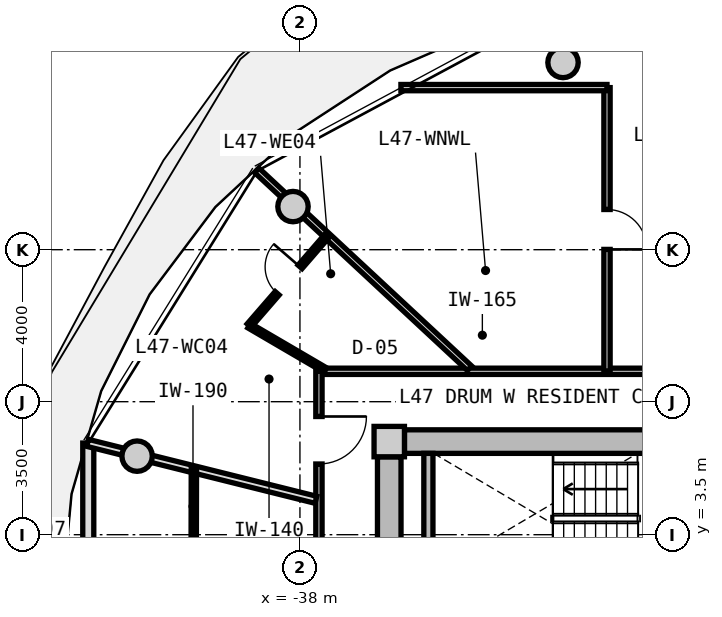
"""IFC4 building model, lengths in metres.
Left out: names, types, materials, properties, quantities, classifications, styles, units other than length and angle.
Written with IfcOpenShell. Run it as: python <this file> out.ifc"""

import sys

from ifc_helpers import new_model, si_unit, direction, frame, frame_2d, origin, origin_2d, place, context, subcontext, project, spatial, rectangle, circle, extrude, source, transform, mapped, element, fill, save


model = new_model("IFC4")
c1 = context("Model", 3, precision=1e-05, world=origin(), true_north=direction((0.0, 1.0)))
c2 = subcontext(c1, "Body", "Model", "MODEL_VIEW")
j1 = project(units=[si_unit("LENGTHUNIT", "METRE"), si_unit("PLANEANGLEUNIT", "RADIAN")], contexts=[c1])
p1 = place(None, origin())
s1 = spatial("IfcSite", under=j1, at=p1, CompositionType="ELEMENT")
p2 = place(p1, origin())
s2 = spatial("IfcBuilding", under=s1, at=p2, CompositionType="ELEMENT")
p3 = place(p2, frame((0.0, 0.0, 152.6)))
s3 = spatial("IfcBuildingStorey", under=s2, at=p3, CompositionType="ELEMENT", Elevation=152.6)
m1 = source(origin(), c2, "Body", "SweptSolid", [
    extrude(rectangle(XDim=0.8, YDim=0.8, at=origin_2d()), origin(), (0.0, 0.0, 1.0), 3.05),
])
p4 = place(p3, frame((-35.65, 5.95, 0.0), z_axis=(0.0, 0.0, 1.0), x_axis=(1.0, 0.0, 0.0)))
e1 = element("IfcColumn", 1, at=p4, inside=s3, PredefinedType="COLUMN", context=c2, shape_type="MappedRepresentation", body=[
    mapped(m1, transform((0.0, 0.0, 0.0), x_axis=(1.0, 0.0, 0.0), y_axis=(0.0, 1.0, 0.0), z_axis=(0.0, 0.0, 1.0), scale=1.0)),
])
m2 = source(origin(), c2, "Body", "SweptSolid", [
    extrude(rectangle(XDim=14.5, YDim=0.62, at=frame_2d((7.25, 0.0))), origin(), (0.0, 0.0, 1.0), 2.81),
])
p5 = place(p3, frame((-35.25, 5.95, 0.0), z_axis=(0.0, 0.0, 1.0), x_axis=(1.0, 0.0, 0.0)))
e2 = element("IfcWall", 2, at=p5, inside=s3, PredefinedType="SHEAR", context=c2, shape_type="MappedRepresentation", body=[
    mapped(m2, transform((0.0, 0.0, 0.0), x_axis=(1.0, 0.0, 0.0), y_axis=(0.0, 1.0, 0.0), z_axis=(0.0, 0.0, 1.0), scale=1.0)),
])
m3 = source(origin(), c2, "Body", "SweptSolid", [
    extrude(rectangle(XDim=11.1, YDim=0.62, at=frame_2d((5.55, 0.0))), origin(), (0.0, 0.0, 1.0), 2.81),
])
p6 = place(p3, frame((-35.65, -5.55, 0.0), z_axis=(0.0, 0.0, 1.0), x_axis=(0.0, 1.0, 0.0)))
e3 = element("IfcWall", 3, at=p6, inside=s3, PredefinedType="SHEAR", context=c2, shape_type="MappedRepresentation", body=[
    mapped(m3, transform((0.0, 0.0, 0.0), x_axis=(1.0, 0.0, 0.0), y_axis=(0.0, 1.0, 0.0), z_axis=(0.0, 0.0, 1.0), scale=1.0)),
])
p7 = place(p6, frame((3.8, 0.0, 0.0)))
e4 = element("IfcOpeningElement", 4, at=p7, cuts=e3, PredefinedType="OPENING", context=c2, shape_type="SweptSolid", body=[
    extrude(rectangle(XDim=1.2, YDim=2.15, at=frame_2d((0.6, 1.075))), frame((0.0, 0.32, 0.0), z_axis=(0.0, -1.0, 0.0), x_axis=(1.0, 0.0, 0.0)), (0.0, 0.0, 1.0), 0.64),
])
m4 = source(origin(), c2, "Body", "SweptSolid", [
    extrude(circle(Radius=0.4, at=origin_2d()), origin(), (0.0, 0.0, 1.0), 3.05),
])
for number, where, z_axis, x_axis in (
    (5, (-31.077, 15.926, 0.0), (0.0, 0.0, 1.0), (1.0, 0.0, 0.0)),
    (6, (-38.183, 12.135, 0.0), (0.0, 0.0, 1.0), (1.0, 0.0, 0.0)),
    (7, (-42.285, 5.567, 0.0), (0.0, 0.0, 1.0), (1.0, 0.0, 0.0)),
):
    element("IfcColumn", number, at=place(p3, frame(where, z_axis=z_axis, x_axis=x_axis)), inside=s3, PredefinedType="COLUMN", context=c2, shape_type="MappedRepresentation", body=[
        mapped(m4, transform((0.0, 0.0, 0.0), x_axis=(1.0, 0.0, 0.0), y_axis=(0.0, 1.0, 0.0), z_axis=(0.0, 0.0, 1.0), scale=1.0)),
    ])
m5 = source(origin(), c2, "Body", "SweptSolid", [
    extrude(rectangle(XDim=8.272, YDim=0.29, at=frame_2d((4.136, 0.0))), origin(), (0.0, 0.0, 1.0), 2.81),
])
p8 = place(p3, frame((-43.57, -2.361, 0.0), z_axis=(0.0, 0.0, 1.0), x_axis=(0.0, 1.0, 0.0)))
e8 = element("IfcWall", 8, at=p8, inside=s3, PredefinedType="SOLIDWALL", context=c2, shape_type="MappedRepresentation", body=[
    mapped(m5, transform((0.0, 0.0, 0.0), x_axis=(1.0, 0.0, 0.0), y_axis=(0.0, 1.0, 0.0), z_axis=(0.0, 0.0, 1.0), scale=1.0)),
])
p9 = place(p8, frame((0.9, 0.0, 0.0)))
e9 = element("IfcOpeningElement", 9, at=p9, cuts=e8, PredefinedType="OPENING", context=c2, shape_type="SweptSolid", body=[
    extrude(rectangle(XDim=1.15, YDim=2.25, at=frame_2d((0.575, 1.125))), frame((0.0, 0.155, 0.0), z_axis=(0.0, -1.0, 0.0), x_axis=(1.0, 0.0, 0.0)), (0.0, 0.0, 1.0), 0.31),
])
p10 = place(p8, frame((4.486, 0.0, 0.85)))
e10 = element("IfcOpeningElement", 10, at=p10, cuts=e8, PredefinedType="OPENING", context=c2, shape_type="SweptSolid", body=[
    extrude(rectangle(XDim=1.2, YDim=1.5, at=frame_2d((0.6, 0.75))), frame((0.0, 0.155, 0.0), z_axis=(0.0, -1.0, 0.0), x_axis=(1.0, 0.0, 0.0)), (0.0, 0.0, 1.0), 0.31),
])
m6 = source(origin(), c2, "Body", "SweptSolid", [
    extrude(rectangle(XDim=3.19, YDim=0.24, at=frame_2d((1.595, 0.0))), origin(), (0.0, 0.0, 1.0), 2.81),
])
p11 = place(p3, frame((-34.62, 2.45, 0.0), z_axis=(0.0, 0.0, 1.0), x_axis=(0.0, 1.0, 0.0)))
e11 = element("IfcWall", 11, at=p11, inside=s3, PredefinedType="PARTITIONING", context=c2, shape_type="MappedRepresentation", body=[
    mapped(m6, transform((0.0, 0.0, 0.0), x_axis=(1.0, 0.0, 0.0), y_axis=(0.0, 1.0, 0.0), z_axis=(0.0, 0.0, 1.0), scale=1.0)),
])
m7 = source(origin(), c2, "Body", "SweptSolid", [
    extrude(rectangle(XDim=8.6, YDim=0.165, at=frame_2d((4.3, 0.0))), origin(), (0.0, 0.0, 1.0), 2.795),
])
p12 = place(p3, frame((-37.5, 7.8, 0.0), z_axis=(0.0, 0.0, 1.0), x_axis=(1.0, 0.0, 0.0)))
e12 = element("IfcWall", 12, at=p12, inside=s3, PredefinedType="PARTITIONING", context=c2, shape_type="MappedRepresentation", body=[
    mapped(m7, transform((0.0, 0.0, 0.0), x_axis=(1.0, 0.0, 0.0), y_axis=(0.0, 1.0, 0.0), z_axis=(0.0, 0.0, 1.0), scale=1.0)),
])
m8 = source(origin(), c2, "Body", "SweptSolid", [
    extrude(rectangle(XDim=15.6, YDim=0.165, at=frame_2d((7.8, 0.0))), origin(), (0.0, 0.0, 1.0), 2.795),
])
p13 = place(p3, frame((-37.5, -7.8, 0.0), z_axis=(0.0, 0.0, 1.0), x_axis=(0.0, 1.0, 0.0)))
e13 = element("IfcWall", 13, at=p13, inside=s3, PredefinedType="PARTITIONING", context=c2, shape_type="MappedRepresentation", body=[
    mapped(m8, transform((0.0, 0.0, 0.0), x_axis=(1.0, 0.0, 0.0), y_axis=(0.0, 1.0, 0.0), z_axis=(0.0, 0.0, 1.0), scale=1.0)),
])
p14 = place(p13, frame((13.16, 0.0, 0.0)))
e14 = element("IfcOpeningElement", 14, at=p14, cuts=e13, PredefinedType="OPENING", context=c2, shape_type="SweptSolid", body=[
    extrude(rectangle(XDim=1.25, YDim=2.2, at=frame_2d((0.625, 1.1))), frame((0.0, 0.093, 0.0), z_axis=(0.0, -1.0, 0.0), x_axis=(1.0, 0.0, 0.0)), (0.0, 0.0, 1.0), 0.185),
])
p15 = place(p13, frame((7.757, 0.0, 0.0)))
e15 = element("IfcOpeningElement", 15, at=p15, cuts=e13, PredefinedType="OPENING", context=c2, shape_type="SweptSolid", body=[
    extrude(rectangle(XDim=1.25, YDim=2.2, at=frame_2d((0.625, 1.1))), frame((0.0, 0.093, 0.0), z_axis=(0.0, -1.0, 0.0), x_axis=(1.0, 0.0, 0.0)), (0.0, 0.0, 1.0), 0.185),
])
p16 = place(p13, frame((1.62, 0.0, 0.0)))
e16 = element("IfcOpeningElement", 16, at=p16, cuts=e13, PredefinedType="OPENING", context=c2, shape_type="SweptSolid", body=[
    extrude(rectangle(XDim=1.25, YDim=2.2, at=frame_2d((0.625, 1.1))), frame((0.0, 0.093, 0.0), z_axis=(0.0, -1.0, 0.0), x_axis=(1.0, 0.0, 0.0)), (0.0, 0.0, 1.0), 0.185),
])
m9 = source(origin(), c2, "Body", "SweptSolid", [
    extrude(rectangle(XDim=7.648, YDim=0.165, at=frame_2d((3.824, 0.0))), origin(), (0.0, 0.0, 1.0), 2.345),
])
p17 = place(p3, frame((-33.538, 7.88, 0.0), z_axis=(0.0, 0.0, 1.0), x_axis=(-0.732167856666, 0.681124239522, 0.0)))
e17 = element("IfcWall", 17, at=p17, inside=s3, PredefinedType="PARTITIONING", context=c2, shape_type="MappedRepresentation", body=[
    mapped(m9, transform((0.0, 0.0, 0.0), x_axis=(1.0, 0.0, 0.0), y_axis=(0.0, 1.0, 0.0), z_axis=(0.0, 0.0, 1.0), scale=1.0)),
])
m10 = source(origin(), c2, "Body", "SweptSolid", [
    extrude(rectangle(XDim=7.465, YDim=0.165, at=frame_2d((3.733, 0.0))), origin(), (0.0, 0.0, 1.0), 2.345),
])
p18 = place(p3, frame((-29.92, 7.8, 0.0), z_axis=(0.0, 0.0, 1.0), x_axis=(0.0, 1.0, 0.0)))
e18 = element("IfcWall", 18, at=p18, inside=s3, PredefinedType="PARTITIONING", context=c2, shape_type="MappedRepresentation", body=[
    mapped(m10, transform((0.0, 0.0, 0.0), x_axis=(1.0, 0.0, 0.0), y_axis=(0.0, 1.0, 0.0), z_axis=(0.0, 0.0, 1.0), scale=1.0)),
])
p19 = place(p18, frame((3.208, 0.0, 0.0)))
e19 = element("IfcOpeningElement", 19, at=p19, cuts=e18, PredefinedType="OPENING", context=c2, shape_type="SweptSolid", body=[
    extrude(rectangle(XDim=1.05, YDim=2.15, at=frame_2d((0.525, 1.075))), frame((0.0, 0.093, 0.0), z_axis=(0.0, -1.0, 0.0), x_axis=(1.0, 0.0, 0.0)), (0.0, 0.0, 1.0), 0.185),
])
m11 = source(origin(), c2, "Body", "SweptSolid", [
    extrude(rectangle(XDim=5.423, YDim=0.165, at=frame_2d((2.711, 0.0))), origin(), (0.0, 0.0, 1.0), 2.795),
])
p20 = place(p3, frame((-35.343, 15.265, 0.0), z_axis=(0.0, 0.0, 1.0), x_axis=(1.0, 0.0, 0.0)))
e20 = element("IfcWall", 20, at=p20, inside=s3, PredefinedType="PARTITIONING", context=c2, shape_type="MappedRepresentation", body=[
    mapped(m11, transform((0.0, 0.0, 0.0), x_axis=(1.0, 0.0, 0.0), y_axis=(0.0, 1.0, 0.0), z_axis=(0.0, 0.0, 1.0), scale=1.0)),
])
m12 = source(origin(), c2, "Body", "SweptSolid", [
    extrude(rectangle(XDim=6.193, YDim=0.19, at=frame_2d((3.096, 0.0))), origin(), (0.0, 0.0, 1.0), 2.345),
])
p21 = place(p3, frame((-37.58, 4.419, 0.0), z_axis=(0.0, 0.0, 1.0), x_axis=(-0.970309243466, 0.241867674657, 0.0)))
e21 = element("IfcWall", 21, at=p21, inside=s3, PredefinedType="PARTITIONING", context=c2, shape_type="MappedRepresentation", body=[
    mapped(m12, transform((0.0, 0.0, 0.0), x_axis=(1.0, 0.0, 0.0), y_axis=(0.0, 1.0, 0.0), z_axis=(0.0, 0.0, 1.0), scale=1.0)),
])
m13 = source(origin(), c2, "Body", "SweptSolid", [
    extrude(rectangle(XDim=2.323, YDim=0.14, at=frame_2d((1.161, 0.0))), origin(), (0.0, 0.0, 1.0), 2.795),
])
p22 = place(p3, frame((-37.331, 7.83, 0.0), z_axis=(0.0, 0.0, 1.0), x_axis=(-0.863343994595, 0.504615841009, 0.0)))
e22 = element("IfcWall", 22, at=p22, inside=s3, PredefinedType="PARTITIONING", context=c2, shape_type="MappedRepresentation", body=[
    mapped(m13, transform((0.0, 0.0, 0.0), x_axis=(1.0, 0.0, 0.0), y_axis=(0.0, 1.0, 0.0), z_axis=(0.0, 0.0, 1.0), scale=1.0)),
])
m14 = source(origin(), c2, "Body", "SweptSolid", [
    extrude(rectangle(XDim=3.171, YDim=0.14, at=frame_2d((1.585, 0.0))), origin(), (0.0, 0.0, 1.0), 2.795),
])
p23 = place(p3, frame((-39.336, 9.002, 0.0), z_axis=(0.0, 0.0, 1.0), x_axis=(0.654953989592, 0.755668757801, 0.0)))
e23 = element("IfcWall", 23, at=p23, inside=s3, PredefinedType="PARTITIONING", context=c2, shape_type="MappedRepresentation", body=[
    mapped(m14, transform((0.0, 0.0, 0.0), x_axis=(1.0, 0.0, 0.0), y_axis=(0.0, 1.0, 0.0), z_axis=(0.0, 0.0, 1.0), scale=1.0)),
])
p24 = place(p23, frame((1.125, 0.0, 0.0)))
e24 = element("IfcOpeningElement", 24, at=p24, cuts=e23, PredefinedType="OPENING", context=c2, shape_type="SweptSolid", body=[
    extrude(rectangle(XDim=0.92, YDim=2.1, at=frame_2d((0.46, 1.05))), frame((0.0, 0.08, 0.0), z_axis=(0.0, -1.0, 0.0), x_axis=(1.0, 0.0, 0.0)), (0.0, 0.0, 1.0), 0.16),
])
m15 = source(origin(), c2, "Body", "SweptSolid", [
    extrude(rectangle(XDim=3.012, YDim=0.14, at=frame_2d((1.506, 0.0))), origin(), (0.0, 0.0, 1.0), 2.795),
])
p25 = place(p3, frame((-40.798, 2.227, 0.0), z_axis=(0.0, 0.0, 1.0), x_axis=(0.00226958968, 0.999997424478, 0.0)))
e25 = element("IfcWall", 25, at=p25, inside=s3, PredefinedType="PARTITIONING", context=c2, shape_type="MappedRepresentation", body=[
    mapped(m15, transform((0.0, 0.0, 0.0), x_axis=(1.0, 0.0, 0.0), y_axis=(0.0, 1.0, 0.0), z_axis=(0.0, 0.0, 1.0), scale=1.0)),
])
m16 = source(origin(), c2, "Body", "SweptSolid", [
    extrude(rectangle(XDim=1.05, YDim=2.15, at=frame_2d((0.525, 1.075))), frame((0.0, 0.025, 0.0), z_axis=(0.0, -1.0, 0.0), x_axis=(1.0, 0.0, 0.0)), (0.0, 0.0, 1.0), 0.05),
])
p26 = place(p19, frame((1.05, 0.0, 0.0), z_axis=(0.0, 0.0, 1.0), x_axis=(-1.0, 0.0, 0.0)))
e26 = element("IfcDoor", 26, at=p26, inside=s3, OperationType="SINGLE_SWING_RIGHT", PredefinedType="DOOR", context=c2, shape_type="MappedRepresentation", body=[
    mapped(m16, transform((0.0, 0.0, 0.0), x_axis=(1.0, 0.0, 0.0), y_axis=(0.0, 1.0, 0.0), z_axis=(0.0, 0.0, 1.0), scale=1.0)),
])
fill(e19, e26)
m17 = source(origin(), c2, "Body", "SweptSolid", [
    extrude(rectangle(XDim=1.25, YDim=2.2, at=frame_2d((0.625, 1.1))), frame((0.0, 0.025, 0.0), z_axis=(0.0, -1.0, 0.0), x_axis=(1.0, 0.0, 0.0)), (0.0, 0.0, 1.0), 0.05),
])
p27 = place(p14, frame((1.25, 0.0, 0.0), z_axis=(0.0, 0.0, 1.0), x_axis=(-1.0, 0.0, 0.0)))
e27 = element("IfcDoor", 27, at=p27, inside=s3, OperationType="SINGLE_SWING_LEFT", PredefinedType="DOOR", context=c2, shape_type="MappedRepresentation", body=[
    mapped(m17, transform((0.0, 0.0, 0.0), x_axis=(1.0, 0.0, 0.0), y_axis=(0.0, 1.0, 0.0), z_axis=(0.0, 0.0, 1.0), scale=1.0)),
])
fill(e14, e27)
m18 = source(origin(), c2, "Body", "SweptSolid", [
    extrude(rectangle(XDim=0.92, YDim=2.1, at=frame_2d((0.46, 1.05))), frame((0.0, 0.025, 0.0), z_axis=(0.0, -1.0, 0.0), x_axis=(1.0, 0.0, 0.0)), (0.0, 0.0, 1.0), 0.05),
])
p28 = place(p24, origin())
e28 = element("IfcDoor", 28, at=p28, inside=s3, OperationType="SINGLE_SWING_RIGHT", PredefinedType="DOOR", context=c2, shape_type="MappedRepresentation", body=[
    mapped(m18, transform((0.0, 0.0, 0.0), x_axis=(1.0, 0.0, 0.0), y_axis=(0.0, 1.0, 0.0), z_axis=(0.0, 0.0, 1.0), scale=1.0)),
])
fill(e24, e28)
save(model, sys.argv[1])
